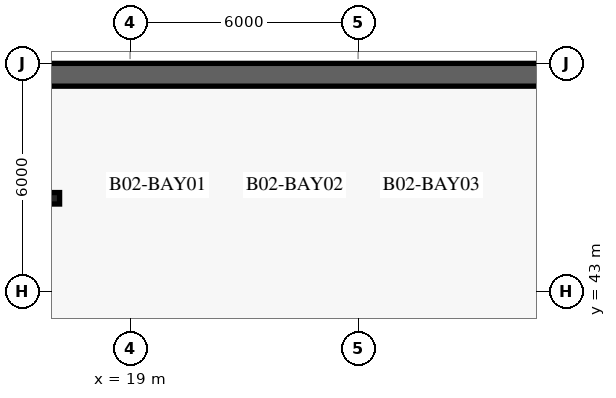
"""IFC4 building model, lengths in metres.
Left out: names, types, materials, properties, quantities, classifications, styles, units other than length and angle.
Written with IfcOpenShell. Run it as: python <this file> out.ifc"""

import sys

from ifc_helpers import new_model, si_unit, direction, frame, frame_2d, origin, place, context, subcontext, project, spatial, rectangle, extrude, element, save


model = new_model("IFC4")
c1 = context("Model", 3, precision=1e-05, world=origin(), true_north=direction((0.0, 1.0)))
c2 = subcontext(c1, "Body", "Model", "MODEL_VIEW")
j1 = project(units=[si_unit("LENGTHUNIT", "METRE"), si_unit("PLANEANGLEUNIT", "RADIAN")], contexts=[c1])
p1 = place(None, origin())
s1 = spatial("IfcSite", under=j1, at=p1, CompositionType="ELEMENT")
p2 = place(p1, origin())
s2 = spatial("IfcBuilding", under=s1, at=p2, CompositionType="ELEMENT")
p3 = place(p2, frame((0.0, 0.0, -8.4)))
s3 = spatial("IfcBuildingStorey", under=s2, at=p3, CompositionType="ELEMENT", Elevation=-8.4)
p4 = place(p3, frame((75.0, 48.7, 0.0), z_axis=(0.0, 0.0, 1.0), x_axis=(-1.0, 0.0, 0.0)))
e1 = element("IfcWall", 1, at=p4, inside=s3, PredefinedType="USERDEFINED", context=c2, shape_type="SweptSolid", body=[
    extrude(rectangle(XDim=74.0, YDim=0.6, at=frame_2d((37.0, 0.0))), origin(), (0.0, 0.0, 1.0), 3.88),
])
save(model, sys.argv[1])
